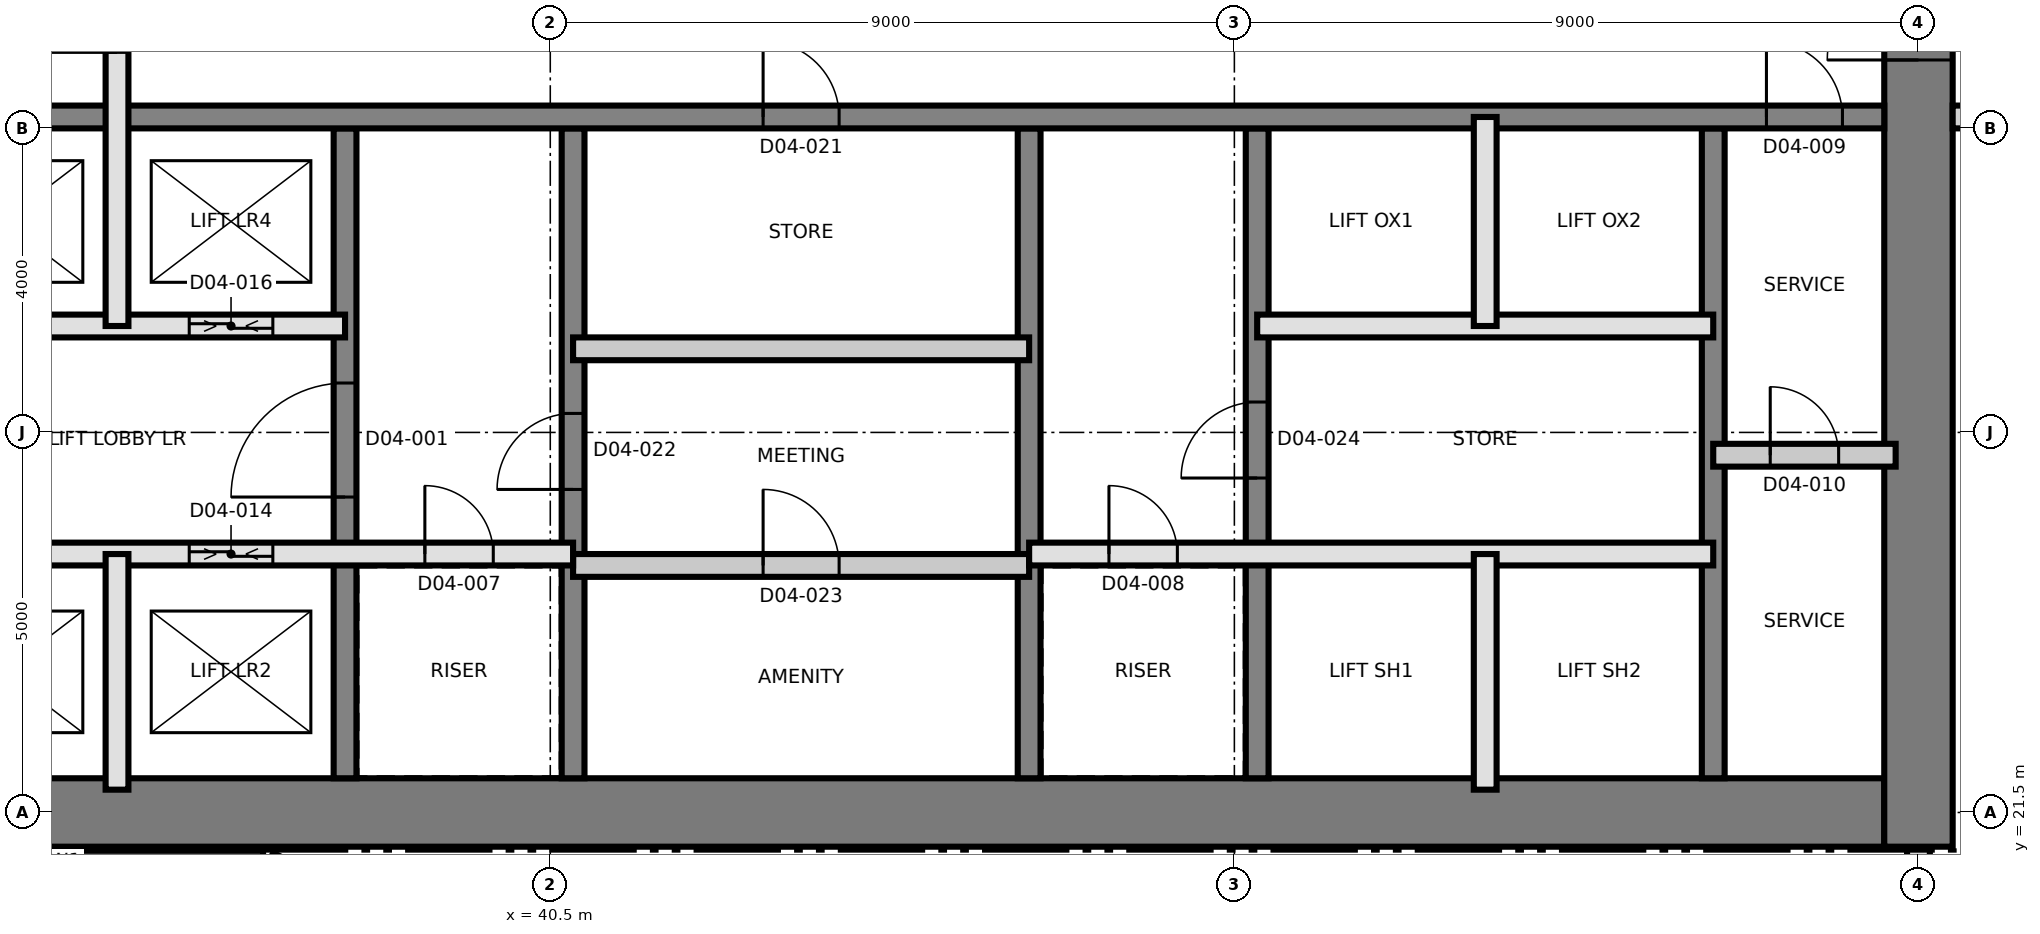
"""IFC4 building model, lengths in metres.
Left out: names, types, materials, properties, quantities, classifications, styles, units other than length and angle.
Written with IfcOpenShell. Run it as: python <this file> out.ifc"""

import sys

from ifc_helpers import new_model, si_unit, direction, frame, frame_2d, origin, place, context, subcontext, project, spatial, rectangle, extrude, element, fill, save


model = new_model("IFC4")
c1 = context("Model", 3, precision=1e-05, world=origin(), true_north=direction((0.0, 1.0)))
c2 = subcontext(c1, "Body", "Model", "MODEL_VIEW")
j1 = project(units=[si_unit("LENGTHUNIT", "METRE"), si_unit("PLANEANGLEUNIT", "RADIAN")], contexts=[c1])
p1 = place(None, origin())
s1 = spatial("IfcSite", under=j1, at=p1, CompositionType="ELEMENT")
p2 = place(p1, origin())
s2 = spatial("IfcBuilding", under=s1, at=p2, CompositionType="ELEMENT")
p3 = place(p2, frame((0.0, 0.0, 66.8)))
s3 = spatial("IfcBuildingStorey", under=s2, at=p3, CompositionType="ELEMENT", Elevation=66.8)
p4 = place(p3, frame((31.05, 21.5, 0.0), z_axis=(0.0, 0.0, 1.0), x_axis=(1.0, 0.0, 0.0)))
e1 = element("IfcWall", 1, at=p4, inside=s3, PredefinedType="SHEAR", context=c2, shape_type="SweptSolid", body=[
    extrude(rectangle(XDim=27.0, YDim=0.9, at=frame_2d((13.5, 0.0))), origin(), (0.0, 0.0, 1.0), 3.7),
])
p5 = place(p3, frame((58.5, 21.05, 0.0), z_axis=(0.0, 0.0, 1.0), x_axis=(0.0, 1.0, 0.0)))
e2 = element("IfcWall", 2, at=p5, inside=s3, PredefinedType="SHEAR", context=c2, shape_type="SweptSolid", body=[
    extrude(rectangle(XDim=18.9, YDim=0.9, at=frame_2d((9.45, 0.0))), origin(), (0.0, 0.0, 1.0), 3.7),
])
p6 = place(p5, frame((10.35, 0.0, 0.0)))
e3 = element("IfcOpeningElement", 3, at=p6, cuts=e2, PredefinedType="OPENING", context=c2, shape_type="SweptSolid", body=[
    extrude(rectangle(XDim=1.2, YDim=2.1, at=frame_2d((0.6, 1.05))), frame((0.0, 0.46, 0.0), z_axis=(0.0, -1.0, 0.0), x_axis=(1.0, 0.0, 0.0)), (0.0, 0.0, 1.0), 0.92),
])
p7 = place(p3, frame((37.8, 21.95, 0.0), z_axis=(0.0, 0.0, 1.0), x_axis=(0.0, 1.0, 0.0)))
e4 = element("IfcWall", 4, at=p7, inside=s3, PredefinedType="SHEAR", context=c2, shape_type="SweptSolid", body=[
    extrude(rectangle(XDim=8.55, YDim=0.3, at=frame_2d((4.275, 0.0))), origin(), (0.0, 0.0, 1.0), 3.7),
])
p8 = place(p7, frame((3.7, 0.0, 0.0)))
e5 = element("IfcOpeningElement", 5, at=p8, cuts=e4, PredefinedType="OPENING", context=c2, shape_type="SweptSolid", body=[
    extrude(rectangle(XDim=1.5, YDim=2.1, at=frame_2d((0.75, 1.05))), frame((0.0, 0.16, 0.0), z_axis=(0.0, -1.0, 0.0), x_axis=(1.0, 0.0, 0.0)), (0.0, 0.0, 1.0), 0.32),
])
p9 = place(p3, frame((40.8, 21.95, 0.0), z_axis=(0.0, 0.0, 1.0), x_axis=(0.0, 1.0, 0.0)))
e6 = element("IfcWall", 6, at=p9, inside=s3, PredefinedType="SHEAR", context=c2, shape_type="SweptSolid", body=[
    extrude(rectangle(XDim=8.55, YDim=0.3, at=frame_2d((4.275, 0.0))), origin(), (0.0, 0.0, 1.0), 3.7),
])
p10 = place(p9, frame((3.8, 0.0, 0.0)))
e7 = element("IfcOpeningElement", 7, at=p10, cuts=e6, PredefinedType="OPENING", context=c2, shape_type="SweptSolid", body=[
    extrude(rectangle(XDim=1.0, YDim=2.1, at=frame_2d((0.5, 1.05))), frame((0.0, 0.16, 0.0), z_axis=(0.0, -1.0, 0.0), x_axis=(1.0, 0.0, 0.0)), (0.0, 0.0, 1.0), 0.32),
])
p11 = place(p3, frame((46.8, 21.95, 0.0), z_axis=(0.0, 0.0, 1.0), x_axis=(0.0, 1.0, 0.0)))
e8 = element("IfcWall", 8, at=p11, inside=s3, PredefinedType="SHEAR", context=c2, shape_type="SweptSolid", body=[
    extrude(rectangle(XDim=8.55, YDim=0.3, at=frame_2d((4.275, 0.0))), origin(), (0.0, 0.0, 1.0), 3.7),
])
p12 = place(p3, frame((49.8, 21.95, 0.0), z_axis=(0.0, 0.0, 1.0), x_axis=(0.0, 1.0, 0.0)))
e9 = element("IfcWall", 9, at=p12, inside=s3, PredefinedType="SHEAR", context=c2, shape_type="SweptSolid", body=[
    extrude(rectangle(XDim=8.55, YDim=0.3, at=frame_2d((4.275, 0.0))), origin(), (0.0, 0.0, 1.0), 3.7),
])
p13 = place(p12, frame((3.95, 0.0, 0.0)))
e10 = element("IfcOpeningElement", 10, at=p13, cuts=e9, PredefinedType="OPENING", context=c2, shape_type="SweptSolid", body=[
    extrude(rectangle(XDim=1.0, YDim=2.1, at=frame_2d((0.5, 1.05))), frame((0.0, 0.16, 0.0), z_axis=(0.0, -1.0, 0.0), x_axis=(1.0, 0.0, 0.0)), (0.0, 0.0, 1.0), 0.32),
])
p14 = place(p3, frame((55.8, 21.95, 0.0), z_axis=(0.0, 0.0, 1.0), x_axis=(0.0, 1.0, 0.0)))
e11 = element("IfcWall", 11, at=p14, inside=s3, PredefinedType="SHEAR", context=c2, shape_type="SweptSolid", body=[
    extrude(rectangle(XDim=8.55, YDim=0.3, at=frame_2d((4.275, 0.0))), origin(), (0.0, 0.0, 1.0), 3.7),
])
p15 = place(p3, frame((31.95, 30.65, 0.0), z_axis=(0.0, 0.0, 1.0), x_axis=(1.0, 0.0, 0.0)))
e12 = element("IfcWall", 12, at=p15, inside=s3, PredefinedType="SHEAR", context=c2, shape_type="SweptSolid", body=[
    extrude(rectangle(XDim=26.1, YDim=0.3, at=frame_2d((13.05, 0.0))), origin(), (0.0, 0.0, 1.0), 3.7),
])
p16 = place(p15, frame((24.55, 0.0, 0.0)))
e13 = element("IfcOpeningElement", 13, at=p16, cuts=e12, PredefinedType="OPENING", context=c2, shape_type="SweptSolid", body=[
    extrude(rectangle(XDim=1.0, YDim=2.1, at=frame_2d((0.5, 1.05))), frame((0.0, 0.16, 0.0), z_axis=(0.0, -1.0, 0.0), x_axis=(1.0, 0.0, 0.0)), (0.0, 0.0, 1.0), 0.32),
])
p17 = place(p15, frame((11.35, 0.0, 0.0)))
e14 = element("IfcOpeningElement", 14, at=p17, cuts=e12, PredefinedType="OPENING", context=c2, shape_type="SweptSolid", body=[
    extrude(rectangle(XDim=1.0, YDim=2.1, at=frame_2d((0.5, 1.05))), frame((0.0, 0.16, 0.0), z_axis=(0.0, -1.0, 0.0), x_axis=(1.0, 0.0, 0.0)), (0.0, 0.0, 1.0), 0.32),
])
p18 = place(p3, frame((31.36, 20.85, 0.0), z_axis=(0.0, 0.0, 1.0), x_axis=(1.0, 0.0, 0.0)))
e15 = element("IfcWall", 15, at=p18, inside=s3, PredefinedType="SOLIDWALL", context=c2, shape_type="SweptSolid", body=[
    extrude(rectangle(XDim=5.362, YDim=0.3, at=frame_2d((2.681, 0.0))), origin(), (0.0, 0.0, 1.0), 3.4),
])
p19 = place(p3, frame((36.788, 20.834, 0.0), z_axis=(0.0, 0.0, 1.0), x_axis=(0.896857753975, -0.442319080682, 0.0)))
e16 = element("IfcWall", 16, at=p19, inside=s3, PredefinedType="SOLIDWALL", context=c2, shape_type="SweptSolid", body=[
    extrude(rectangle(XDim=1.618, YDim=0.3, at=frame_2d((0.809, 0.0))), origin(), (0.0, 0.0, 1.0), 3.4),
])
p20 = place(p3, frame((40.8, 24.75, 0.0), z_axis=(0.0, 0.0, 1.0), x_axis=(1.0, 0.0, 0.0)))
e17 = element("IfcWall", 17, at=p20, inside=s3, PredefinedType="PARTITIONING", context=c2, shape_type="SweptSolid", body=[
    extrude(rectangle(XDim=6.0, YDim=0.3, at=frame_2d((3.0, 0.0))), origin(), (0.0, 0.0, 1.0), 3.4),
])
p21 = place(p20, frame((2.5, 0.0, 0.0)))
e18 = element("IfcOpeningElement", 18, at=p21, cuts=e17, PredefinedType="OPENING", context=c2, shape_type="SweptSolid", body=[
    extrude(rectangle(XDim=1.0, YDim=2.1, at=frame_2d((0.5, 1.05))), frame((0.0, 0.16, 0.0), z_axis=(0.0, -1.0, 0.0), x_axis=(1.0, 0.0, 0.0)), (0.0, 0.0, 1.0), 0.32),
])
p22 = place(p3, frame((31.8, 24.9, 0.0), z_axis=(0.0, 0.0, 1.0), x_axis=(1.0, 0.0, 0.0)))
e19 = element("IfcWall", 19, at=p22, inside=s3, PredefinedType="SOLIDWALL", context=c2, shape_type="SweptSolid", body=[
    extrude(rectangle(XDim=9.0, YDim=0.3, at=frame_2d((4.5, 0.0))), origin(), (0.0, 0.0, 1.0), 3.4),
])
p23 = place(p22, frame((7.05, 0.0, 0.0)))
e20 = element("IfcOpeningElement", 20, at=p23, cuts=e19, PredefinedType="OPENING", context=c2, shape_type="SweptSolid", body=[
    extrude(rectangle(XDim=0.9, YDim=2.1, at=frame_2d((0.45, 1.05))), frame((0.0, 0.16, 0.0), z_axis=(0.0, -1.0, 0.0), x_axis=(1.0, 0.0, 0.0)), (0.0, 0.0, 1.0), 0.32),
])
p24 = place(p22, frame((0.95, 0.0, 0.0)))
e21 = element("IfcOpeningElement", 21, at=p24, cuts=e19, PredefinedType="OPENING", context=c2, shape_type="SweptSolid", body=[
    extrude(rectangle(XDim=1.1, YDim=2.4, at=frame_2d((0.55, 1.2))), frame((0.0, 0.16, 0.0), z_axis=(0.0, -1.0, 0.0), x_axis=(1.0, 0.0, 0.0)), (0.0, 0.0, 1.0), 0.32),
])
p25 = place(p22, frame((3.95, 0.0, 0.0)))
e22 = element("IfcOpeningElement", 22, at=p25, cuts=e19, PredefinedType="OPENING", context=c2, shape_type="SweptSolid", body=[
    extrude(rectangle(XDim=1.1, YDim=2.4, at=frame_2d((0.55, 1.2))), frame((0.0, 0.16, 0.0), z_axis=(0.0, -1.0, 0.0), x_axis=(1.0, 0.0, 0.0)), (0.0, 0.0, 1.0), 0.32),
])
p26 = place(p3, frame((46.8, 24.9, 0.0), z_axis=(0.0, 0.0, 1.0), x_axis=(1.0, 0.0, 0.0)))
e23 = element("IfcWall", 23, at=p26, inside=s3, PredefinedType="SOLIDWALL", context=c2, shape_type="SweptSolid", body=[
    extrude(rectangle(XDim=9.0, YDim=0.3, at=frame_2d((4.5, 0.0))), origin(), (0.0, 0.0, 1.0), 3.4),
])
p27 = place(p26, frame((1.05, 0.0, 0.0)))
e24 = element("IfcOpeningElement", 24, at=p27, cuts=e23, PredefinedType="OPENING", context=c2, shape_type="SweptSolid", body=[
    extrude(rectangle(XDim=0.9, YDim=2.1, at=frame_2d((0.45, 1.05))), frame((0.0, 0.16, 0.0), z_axis=(0.0, -1.0, 0.0), x_axis=(1.0, 0.0, 0.0)), (0.0, 0.0, 1.0), 0.32),
])
p28 = place(p3, frame((55.8, 26.2, 0.0), z_axis=(0.0, 0.0, 1.0), x_axis=(1.0, 0.0, 0.0)))
e25 = element("IfcWall", 25, at=p28, inside=s3, PredefinedType="PARTITIONING", context=c2, shape_type="SweptSolid", body=[
    extrude(rectangle(XDim=2.4, YDim=0.3, at=frame_2d((1.2, 0.0))), origin(), (0.0, 0.0, 1.0), 3.4),
])
p29 = place(p28, frame((0.75, 0.0, 0.0)))
e26 = element("IfcOpeningElement", 26, at=p29, cuts=e25, PredefinedType="OPENING", context=c2, shape_type="SweptSolid", body=[
    extrude(rectangle(XDim=0.9, YDim=2.1, at=frame_2d((0.45, 1.05))), frame((0.0, 0.16, 0.0), z_axis=(0.0, -1.0, 0.0), x_axis=(1.0, 0.0, 0.0)), (0.0, 0.0, 1.0), 0.32),
])
p30 = place(p3, frame((40.8, 27.6, 0.0), z_axis=(0.0, 0.0, 1.0), x_axis=(1.0, 0.0, 0.0)))
e27 = element("IfcWall", 27, at=p30, inside=s3, PredefinedType="PARTITIONING", context=c2, shape_type="SweptSolid", body=[
    extrude(rectangle(XDim=6.0, YDim=0.3, at=frame_2d((3.0, 0.0))), origin(), (0.0, 0.0, 1.0), 3.4),
])
p31 = place(p3, frame((31.8, 27.9, 0.0), z_axis=(0.0, 0.0, 1.0), x_axis=(1.0, 0.0, 0.0)))
e28 = element("IfcWall", 28, at=p31, inside=s3, PredefinedType="SOLIDWALL", context=c2, shape_type="SweptSolid", body=[
    extrude(rectangle(XDim=6.0, YDim=0.3, at=frame_2d((3.0, 0.0))), origin(), (0.0, 0.0, 1.0), 3.4),
])
p32 = place(p31, frame((0.95, 0.0, 0.0)))
e29 = element("IfcOpeningElement", 29, at=p32, cuts=e28, PredefinedType="OPENING", context=c2, shape_type="SweptSolid", body=[
    extrude(rectangle(XDim=1.1, YDim=2.4, at=frame_2d((0.55, 1.2))), frame((0.0, 0.16, 0.0), z_axis=(0.0, -1.0, 0.0), x_axis=(1.0, 0.0, 0.0)), (0.0, 0.0, 1.0), 0.32),
])
p33 = place(p31, frame((3.95, 0.0, 0.0)))
e30 = element("IfcOpeningElement", 30, at=p33, cuts=e28, PredefinedType="OPENING", context=c2, shape_type="SweptSolid", body=[
    extrude(rectangle(XDim=1.1, YDim=2.4, at=frame_2d((0.55, 1.2))), frame((0.0, 0.16, 0.0), z_axis=(0.0, -1.0, 0.0), x_axis=(1.0, 0.0, 0.0)), (0.0, 0.0, 1.0), 0.32),
])
p34 = place(p3, frame((49.8, 27.9, 0.0), z_axis=(0.0, 0.0, 1.0), x_axis=(1.0, 0.0, 0.0)))
e31 = element("IfcWall", 31, at=p34, inside=s3, PredefinedType="SOLIDWALL", context=c2, shape_type="SweptSolid", body=[
    extrude(rectangle(XDim=6.0, YDim=0.3, at=frame_2d((3.0, 0.0))), origin(), (0.0, 0.0, 1.0), 3.4),
])
p35 = place(p3, frame((34.8, 21.8, 0.0), z_axis=(0.0, 0.0, 1.0), x_axis=(0.0, 1.0, 0.0)))
e32 = element("IfcWall", 32, at=p35, inside=s3, PredefinedType="SOLIDWALL", context=c2, shape_type="SweptSolid", body=[
    extrude(rectangle(XDim=3.1, YDim=0.3, at=frame_2d((1.55, 0.0))), origin(), (0.0, 0.0, 1.0), 3.4),
])
p36 = place(p3, frame((34.8, 27.9, 0.0), z_axis=(0.0, 0.0, 1.0), x_axis=(0.0, 1.0, 0.0)))
e33 = element("IfcWall", 33, at=p36, inside=s3, PredefinedType="SOLIDWALL", context=c2, shape_type="SweptSolid", body=[
    extrude(rectangle(XDim=5.45, YDim=0.3, at=frame_2d((2.725, 0.0))), origin(), (0.0, 0.0, 1.0), 3.4),
])
p37 = place(p36, frame((3.6, 0.0, 0.0)))
e34 = element("IfcOpeningElement", 34, at=p37, cuts=e33, PredefinedType="OPENING", context=c2, shape_type="SweptSolid", body=[
    extrude(rectangle(XDim=1.0, YDim=2.1, at=frame_2d((0.5, 1.05))), frame((0.0, 0.16, 0.0), z_axis=(0.0, -1.0, 0.0), x_axis=(1.0, 0.0, 0.0)), (0.0, 0.0, 1.0), 0.32),
])
p38 = place(p3, frame((52.8, 21.8, 0.0), z_axis=(0.0, 0.0, 1.0), x_axis=(0.0, 1.0, 0.0)))
e35 = element("IfcWall", 35, at=p38, inside=s3, PredefinedType="SOLIDWALL", context=c2, shape_type="SweptSolid", body=[
    extrude(rectangle(XDim=3.1, YDim=0.3, at=frame_2d((1.55, 0.0))), origin(), (0.0, 0.0, 1.0), 3.4),
])
p39 = place(p3, frame((52.8, 27.9, 0.0), z_axis=(0.0, 0.0, 1.0), x_axis=(0.0, 1.0, 0.0)))
e36 = element("IfcWall", 36, at=p39, inside=s3, PredefinedType="SOLIDWALL", context=c2, shape_type="SweptSolid", body=[
    extrude(rectangle(XDim=2.75, YDim=0.3, at=frame_2d((1.375, 0.0))), origin(), (0.0, 0.0, 1.0), 3.4),
])
p40 = place(p3, frame((58.95, 30.65, 0.0), z_axis=(0.0, 0.0, 1.0), x_axis=(1.0, 0.0, 0.0)))
e37 = element("IfcWall", 37, at=p40, inside=s3, PredefinedType="PARTITIONING", context=c2, shape_type="SweptSolid", body=[
    extrude(rectangle(XDim=26.38, YDim=0.3, at=frame_2d((13.19, 0.0))), origin(), (0.0, 0.0, 1.0), 3.4),
])
p41 = place(p40, frame((1.25, 0.0, 0.0)))
e38 = element("IfcOpeningElement", 38, at=p41, cuts=e37, PredefinedType="OPENING", context=c2, shape_type="SweptSolid", body=[
    extrude(rectangle(XDim=1.2, YDim=2.1, at=frame_2d((0.6, 1.05))), frame((0.0, 0.16, 0.0), z_axis=(0.0, -1.0, 0.0), x_axis=(1.0, 0.0, 0.0)), (0.0, 0.0, 1.0), 0.32),
])
p42 = place(p40, frame((4.5, 0.0, 0.0)))
e39 = element("IfcOpeningElement", 39, at=p42, cuts=e37, PredefinedType="OPENING", context=c2, shape_type="SweptSolid", body=[
    extrude(rectangle(XDim=1.0, YDim=2.1, at=frame_2d((0.5, 1.05))), frame((0.0, 0.16, 0.0), z_axis=(0.0, -1.0, 0.0), x_axis=(1.0, 0.0, 0.0)), (0.0, 0.0, 1.0), 0.32),
])
p43 = place(p40, frame((14.2, 0.0, 0.0)))
e40 = element("IfcOpeningElement", 40, at=p43, cuts=e37, PredefinedType="OPENING", context=c2, shape_type="SweptSolid", body=[
    extrude(rectangle(XDim=1.0, YDim=2.4, at=frame_2d((0.5, 1.2))), frame((0.0, 0.16, 0.0), z_axis=(0.0, -1.0, 0.0), x_axis=(1.0, 0.0, 0.0)), (0.0, 0.0, 1.0), 0.32),
])
p44 = place(p40, frame((18.685, 0.0, 0.0)))
e41 = element("IfcOpeningElement", 41, at=p44, cuts=e37, PredefinedType="OPENING", context=c2, shape_type="SweptSolid", body=[
    extrude(rectangle(XDim=1.2, YDim=2.1, at=frame_2d((0.6, 1.05))), frame((0.0, 0.16, 0.0), z_axis=(0.0, -1.0, 0.0), x_axis=(1.0, 0.0, 0.0)), (0.0, 0.0, 1.0), 0.32),
])
p45 = place(p40, frame((21.935, 0.0, 0.0)))
e42 = element("IfcOpeningElement", 42, at=p45, cuts=e37, PredefinedType="OPENING", context=c2, shape_type="SweptSolid", body=[
    extrude(rectangle(XDim=1.0, YDim=2.1, at=frame_2d((0.5, 1.05))), frame((0.0, 0.16, 0.0), z_axis=(0.0, -1.0, 0.0), x_axis=(1.0, 0.0, 0.0)), (0.0, 0.0, 1.0), 0.32),
])
p46 = place(p3, frame((58.5, 19.17, 0.0), z_axis=(0.0, 0.0, 1.0), x_axis=(0.0, 1.0, 0.0)))
e43 = element("IfcWall", 43, at=p46, inside=s3, PredefinedType="PARTITIONING", context=c2, shape_type="SweptSolid", body=[
    extrude(rectangle(XDim=1.86, YDim=0.3, at=frame_2d((0.93, 0.0))), origin(), (0.0, 0.0, 1.0), 3.35),
])
p47 = place(p8, origin())
e44 = element("IfcDoor", 44, at=p47, inside=s3, OperationType="SINGLE_SWING_LEFT", PredefinedType="DOOR", context=c2, shape_type="SweptSolid", body=[
    extrude(rectangle(XDim=1.5, YDim=2.1, at=frame_2d((0.75, 1.05))), frame((0.0, 0.025, 0.0), z_axis=(0.0, -1.0, 0.0), x_axis=(1.0, 0.0, 0.0)), (0.0, 0.0, 1.0), 0.05),
])
fill(e5, e44)
p48 = place(p23, origin())
e45 = element("IfcDoor", 45, at=p48, inside=s3, OperationType="SINGLE_SWING_LEFT", PredefinedType="DOOR", context=c2, shape_type="SweptSolid", body=[
    extrude(rectangle(XDim=0.9, YDim=2.1, at=frame_2d((0.45, 1.05))), frame((0.0, 0.025, 0.0), z_axis=(0.0, -1.0, 0.0), x_axis=(1.0, 0.0, 0.0)), (0.0, 0.0, 1.0), 0.05),
])
fill(e20, e45)
p49 = place(p27, origin())
e46 = element("IfcDoor", 46, at=p49, inside=s3, OperationType="SINGLE_SWING_RIGHT", PredefinedType="DOOR", context=c2, shape_type="SweptSolid", body=[
    extrude(rectangle(XDim=0.9, YDim=2.1, at=frame_2d((0.45, 1.05))), frame((0.0, 0.025, 0.0), z_axis=(0.0, -1.0, 0.0), x_axis=(1.0, 0.0, 0.0)), (0.0, 0.0, 1.0), 0.05),
])
fill(e24, e46)
p50 = place(p16, origin())
e47 = element("IfcDoor", 47, at=p50, inside=s3, OperationType="SINGLE_SWING_LEFT", PredefinedType="DOOR", context=c2, shape_type="SweptSolid", body=[
    extrude(rectangle(XDim=1.0, YDim=2.1, at=frame_2d((0.5, 1.05))), frame((0.0, 0.025, 0.0), z_axis=(0.0, -1.0, 0.0), x_axis=(1.0, 0.0, 0.0)), (0.0, 0.0, 1.0), 0.05),
])
fill(e13, e47)
p51 = place(p29, origin())
e48 = element("IfcDoor", 48, at=p51, inside=s3, OperationType="SINGLE_SWING_RIGHT", PredefinedType="DOOR", context=c2, shape_type="SweptSolid", body=[
    extrude(rectangle(XDim=0.9, YDim=2.1, at=frame_2d((0.45, 1.05))), frame((0.0, 0.025, 0.0), z_axis=(0.0, -1.0, 0.0), x_axis=(1.0, 0.0, 0.0)), (0.0, 0.0, 1.0), 0.05),
])
fill(e26, e48)
p52 = place(p6, origin())
e49 = element("IfcDoor", 49, at=p52, inside=s3, OperationType="SINGLE_SWING_LEFT", PredefinedType="DOOR", context=c2, shape_type="SweptSolid", body=[
    extrude(rectangle(XDim=1.2, YDim=2.1, at=frame_2d((0.6, 1.05))), frame((0.0, 0.025, 0.0), z_axis=(0.0, -1.0, 0.0), x_axis=(1.0, 0.0, 0.0)), (0.0, 0.0, 1.0), 0.05),
])
fill(e3, e49)
p53 = place(p25, origin())
e50 = element("IfcDoor", 50, at=p53, inside=s3, OperationType="SLIDING_TO_LEFT", PredefinedType="DOOR", context=c2, shape_type="SweptSolid", body=[
    extrude(rectangle(XDim=1.1, YDim=2.4, at=frame_2d((0.55, 1.2))), frame((0.0, 0.025, 0.0), z_axis=(0.0, -1.0, 0.0), x_axis=(1.0, 0.0, 0.0)), (0.0, 0.0, 1.0), 0.05),
])
fill(e22, e50)
p54 = place(p33, origin())
e51 = element("IfcDoor", 51, at=p54, inside=s3, OperationType="SLIDING_TO_LEFT", PredefinedType="DOOR", context=c2, shape_type="SweptSolid", body=[
    extrude(rectangle(XDim=1.1, YDim=2.4, at=frame_2d((0.55, 1.2))), frame((0.0, 0.025, 0.0), z_axis=(0.0, -1.0, 0.0), x_axis=(1.0, 0.0, 0.0)), (0.0, 0.0, 1.0), 0.05),
])
fill(e30, e51)
p55 = place(p17, origin())
e52 = element("IfcDoor", 52, at=p55, inside=s3, OperationType="SINGLE_SWING_LEFT", PredefinedType="DOOR", context=c2, shape_type="SweptSolid", body=[
    extrude(rectangle(XDim=1.0, YDim=2.1, at=frame_2d((0.5, 1.05))), frame((0.0, 0.025, 0.0), z_axis=(0.0, -1.0, 0.0), x_axis=(1.0, 0.0, 0.0)), (0.0, 0.0, 1.0), 0.05),
])
fill(e14, e52)
p56 = place(p10, origin())
e53 = element("IfcDoor", 53, at=p56, inside=s3, OperationType="SINGLE_SWING_RIGHT", PredefinedType="DOOR", context=c2, shape_type="SweptSolid", body=[
    extrude(rectangle(XDim=1.0, YDim=2.1, at=frame_2d((0.5, 1.05))), frame((0.0, 0.025, 0.0), z_axis=(0.0, -1.0, 0.0), x_axis=(1.0, 0.0, 0.0)), (0.0, 0.0, 1.0), 0.05),
])
fill(e7, e53)
p57 = place(p21, origin())
e54 = element("IfcDoor", 54, at=p57, inside=s3, OperationType="SINGLE_SWING_RIGHT", PredefinedType="DOOR", context=c2, shape_type="SweptSolid", body=[
    extrude(rectangle(XDim=1.0, YDim=2.1, at=frame_2d((0.5, 1.05))), frame((0.0, 0.025, 0.0), z_axis=(0.0, -1.0, 0.0), x_axis=(1.0, 0.0, 0.0)), (0.0, 0.0, 1.0), 0.05),
])
fill(e18, e54)
p58 = place(p13, origin())
e55 = element("IfcDoor", 55, at=p58, inside=s3, OperationType="SINGLE_SWING_RIGHT", PredefinedType="DOOR", context=c2, shape_type="SweptSolid", body=[
    extrude(rectangle(XDim=1.0, YDim=2.1, at=frame_2d((0.5, 1.05))), frame((0.0, 0.025, 0.0), z_axis=(0.0, -1.0, 0.0), x_axis=(1.0, 0.0, 0.0)), (0.0, 0.0, 1.0), 0.05),
])
fill(e10, e55)
save(model, sys.argv[1])
